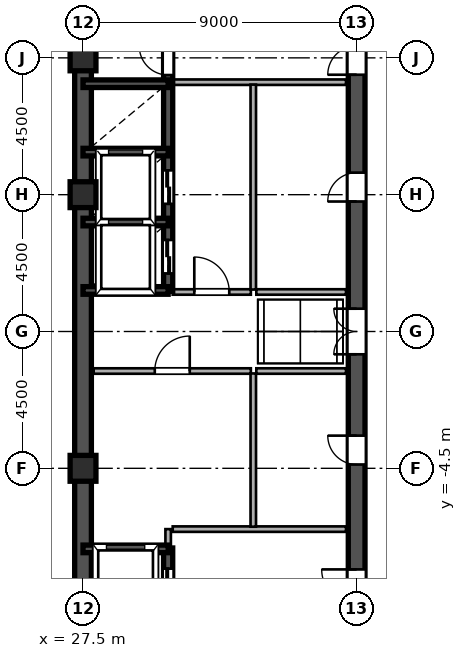
"""IFC4 building model, lengths in metres.
Left out: names, types, materials, properties, quantities, classifications, styles, units other than length and angle.
Written with IfcOpenShell. Run it as: python <this file> out.ifc"""

import sys

from ifc_helpers import new_model, si_unit, direction, frame, frame_2d, origin, origin_2d, place, context, subcontext, project, spatial, rectangle, hollow_rectangle, extrude, source, transform, mapped, element, fill, save


model = new_model("IFC4")
c1 = context("Model", 3, precision=1e-05, world=origin(), true_north=direction((0.0, 1.0)))
c2 = subcontext(c1, "Body", "Model", "MODEL_VIEW")
j1 = project(units=[si_unit("LENGTHUNIT", "METRE"), si_unit("PLANEANGLEUNIT", "RADIAN")], contexts=[c1])
p1 = place(None, origin())
s1 = spatial("IfcSite", under=j1, at=p1, CompositionType="ELEMENT")
p2 = place(p1, origin())
s2 = spatial("IfcBuilding", under=s1, at=p2, CompositionType="ELEMENT")
p3 = place(p2, frame((0.0, 0.0, 174.3)))
s3 = spatial("IfcBuildingStorey", under=s2, at=p3, CompositionType="ELEMENT", Elevation=174.3)
m1 = source(origin(), c2, "Body", "SweptSolid", [
    extrude(hollow_rectangle(XDim=0.85, YDim=0.85, WallThickness=0.036, at=origin_2d()), origin(), (0.0, 0.0, 1.0), 3.6),
])
for number, where, z_axis, x_axis in (
    (1, (27.5, -4.5, 0.0), (0.0, 0.0, 1.0), (1.0, 0.0, 0.0)),
    (2, (27.5, 4.5, 0.0), (0.0, 0.0, 1.0), (1.0, 0.0, 0.0)),
    (3, (27.5, 9.0, 0.0), (0.0, 0.0, 1.0), (1.0, 0.0, 0.0)),
):
    element("IfcColumn", number, at=place(p3, frame(where, z_axis=z_axis, x_axis=x_axis)), inside=s3, PredefinedType="COLUMN", context=c2, shape_type="MappedRepresentation", body=[
        mapped(m1, transform((0.0, 0.0, 0.0), scale=1.0)),
    ])
for number, where, z_axis, x_axis in (
    (4, (27.5, -13.5, 0.0), (0.0, 0.0, 1.0), (0.0, 1.0, 0.0)),
    (5, (27.5, 1.3, 0.0), (0.0, 0.0, 1.0), (0.0, 1.0, 0.0)),
):
    element("IfcWall", number, at=place(p3, frame(where, z_axis=z_axis, x_axis=x_axis)), inside=s3, PredefinedType="SHEAR", context=c2, shape_type="SweptSolid", body=[
        extrude(rectangle(XDim=12.2, YDim=0.55, at=frame_2d((6.1, 0.0))), origin(), (0.0, 0.0, 1.0), 3.38),
    ])
p4 = place(p3, frame((27.5, -1.3, 0.0), z_axis=(0.0, 0.0, 1.0), x_axis=(0.0, 1.0, 0.0)))
e6 = element("IfcWall", 6, at=p4, inside=s3, PredefinedType="SHEAR", context=c2, shape_type="SweptSolid", body=[
    extrude(rectangle(XDim=2.6, YDim=0.55, at=frame_2d((1.3, 0.0))), origin(), (0.0, 0.0, 1.0), 3.38),
])
p5 = place(p3, frame((36.5, -13.65, 0.0), z_axis=(0.0, 0.0, 1.0), x_axis=(0.0, 1.0, 0.0)))
e7 = element("IfcWall", 7, at=p5, inside=s3, PredefinedType="SHEAR", context=c2, shape_type="SweptSolid", body=[
    extrude(rectangle(XDim=7.15, YDim=0.55, at=frame_2d((3.575, 0.0))), origin(), (0.0, 0.0, 1.0), 3.38),
])
p6 = place(p5, frame((4.675, 0.0, 0.0)))
e8 = element("IfcOpeningElement", 8, at=p6, cuts=e7, PredefinedType="OPENING", context=c2, shape_type="SweptSolid", body=[
    extrude(rectangle(XDim=1.15, YDim=2.2, at=frame_2d((0.575, 1.1))), frame((0.0, 0.285, 0.0), z_axis=(0.0, -1.0, 0.0), x_axis=(1.0, 0.0, 0.0)), (0.0, 0.0, 1.0), 0.57),
])
p7 = place(p3, frame((36.5, -1.3, 0.0), z_axis=(0.0, 0.0, 1.0), x_axis=(0.0, 1.0, 0.0)))
e9 = element("IfcWall", 9, at=p7, inside=s3, PredefinedType="SHEAR", context=c2, shape_type="SweptSolid", body=[
    extrude(rectangle(XDim=2.6, YDim=0.55, at=frame_2d((1.3, 0.0))), origin(), (0.0, 0.0, 1.0), 3.38),
])
p8 = place(p7, frame((0.55, 0.0, 0.0)))
e10 = element("IfcOpeningElement", 10, at=p8, cuts=e9, PredefinedType="OPENING", context=c2, shape_type="SweptSolid", body=[
    extrude(rectangle(XDim=1.5, YDim=2.3, at=frame_2d((0.75, 1.15))), frame((0.0, 0.285, 0.0), z_axis=(0.0, -1.0, 0.0), x_axis=(1.0, 0.0, 0.0)), (0.0, 0.0, 1.0), 0.57),
])
p9 = place(p3, frame((36.5, 8.2, 0.0), z_axis=(0.0, 0.0, 1.0), x_axis=(0.0, 1.0, 0.0)))
e11 = element("IfcWall", 11, at=p9, inside=s3, PredefinedType="SHEAR", context=c2, shape_type="SweptSolid", body=[
    extrude(rectangle(XDim=5.45, YDim=0.55, at=frame_2d((2.725, 0.0))), origin(), (0.0, 0.0, 1.0), 3.38),
])
p10 = place(p9, frame((0.245, 0.0, 0.0)))
e12 = element("IfcOpeningElement", 12, at=p10, cuts=e11, PredefinedType="OPENING", context=c2, shape_type="SweptSolid", body=[
    extrude(rectangle(XDim=0.95, YDim=2.15, at=frame_2d((0.475, 1.075))), frame((0.0, 0.285, 0.0), z_axis=(0.0, -1.0, 0.0), x_axis=(1.0, 0.0, 0.0)), (0.0, 0.0, 1.0), 0.57),
])
p11 = place(p3, frame((36.5, -6.5, 0.0), z_axis=(0.0, 0.0, 1.0), x_axis=(0.0, 1.0, 0.0)))
e13 = element("IfcWall", 13, at=p11, inside=s3, PredefinedType="SHEAR", context=c2, shape_type="SweptSolid", body=[
    extrude(rectangle(XDim=5.2, YDim=0.55, at=frame_2d((2.6, 0.0))), origin(), (0.0, 0.0, 1.0), 3.38),
])
p12 = place(p11, frame((2.125, 0.0, 0.0)))
e14 = element("IfcOpeningElement", 14, at=p12, cuts=e13, PredefinedType="OPENING", context=c2, shape_type="SweptSolid", body=[
    extrude(rectangle(XDim=0.95, YDim=2.15, at=frame_2d((0.475, 1.075))), frame((0.0, 0.285, 0.0), z_axis=(0.0, -1.0, 0.0), x_axis=(1.0, 0.0, 0.0)), (0.0, 0.0, 1.0), 0.57),
])
p13 = place(p3, frame((36.5, 1.3, 0.0), z_axis=(0.0, 0.0, 1.0), x_axis=(0.0, 1.0, 0.0)))
e15 = element("IfcWall", 15, at=p13, inside=s3, PredefinedType="SHEAR", context=c2, shape_type="SweptSolid", body=[
    extrude(rectangle(XDim=6.9, YDim=0.55, at=frame_2d((3.45, 0.0))), origin(), (0.0, 0.0, 1.0), 3.38),
])
p14 = place(p13, frame((2.975, 0.0, 0.0)))
e16 = element("IfcOpeningElement", 16, at=p14, cuts=e15, PredefinedType="OPENING", context=c2, shape_type="SweptSolid", body=[
    extrude(rectangle(XDim=0.95, YDim=2.15, at=frame_2d((0.475, 1.075))), frame((0.0, 0.285, 0.0), z_axis=(0.0, -1.0, 0.0), x_axis=(1.0, 0.0, 0.0)), (0.0, 0.0, 1.0), 0.57),
])
for number, where, z_axis, x_axis in (
    (17, (27.5, -7.15, 0.0), (0.0, 0.0, 1.0), (1.0, 0.0, 0.0)),
    (18, (27.5, 1.35, 0.0), (0.0, 0.0, 1.0), (1.0, 0.0, 0.0)),
    (19, (27.5, 3.6, 0.0), (0.0, 0.0, 1.0), (1.0, 0.0, 0.0)),
    (20, (27.5, 5.9, 0.0), (0.0, 0.0, 1.0), (1.0, 0.0, 0.0)),
    (21, (27.5, 8.15, 0.0), (0.0, 0.0, 1.0), (1.0, 0.0, 0.0)),
):
    element("IfcWall", number, at=place(p3, frame(where, z_axis=z_axis, x_axis=x_axis)), inside=s3, PredefinedType="SHEAR", context=c2, shape_type="SweptSolid", body=[
        extrude(rectangle(XDim=2.8, YDim=0.25, at=frame_2d((1.4, 0.0))), origin(), (0.0, 0.0, 1.0), 3.38),
    ])
p15 = place(p3, frame((30.3, -9.68, 0.0), z_axis=(0.0, 0.0, 1.0), x_axis=(0.0, 1.0, 0.0)))
e22 = element("IfcWall", 22, at=p15, inside=s3, PredefinedType="SHEAR", context=c2, shape_type="SweptSolid", body=[
    extrude(rectangle(XDim=2.56, YDim=0.3, at=frame_2d((1.28, 0.0))), origin(), (0.0, 0.0, 1.0), 3.38),
])
p16 = place(p15, frame((0.68, 0.0, 0.0)))
e23 = element("IfcOpeningElement", 23, at=p16, cuts=e22, PredefinedType="OPENING", context=c2, shape_type="SweptSolid", body=[
    extrude(rectangle(XDim=1.2, YDim=2.25, at=frame_2d((0.6, 1.125))), frame((0.0, 0.16, 0.0), z_axis=(0.0, -1.0, 0.0), x_axis=(1.0, 0.0, 0.0)), (0.0, 0.0, 1.0), 0.32),
])
p17 = place(p3, frame((30.3, 1.32, 0.0), z_axis=(0.0, 0.0, 1.0), x_axis=(0.0, 1.0, 0.0)))
e24 = element("IfcWall", 24, at=p17, inside=s3, PredefinedType="SHEAR", context=c2, shape_type="SweptSolid", body=[
    extrude(rectangle(XDim=2.28, YDim=0.3, at=frame_2d((1.14, 0.0))), origin(), (0.0, 0.0, 1.0), 3.38),
])
p18 = place(p17, frame((0.59, 0.0, 0.0)))
e25 = element("IfcOpeningElement", 25, at=p18, cuts=e24, PredefinedType="OPENING", context=c2, shape_type="SweptSolid", body=[
    extrude(rectangle(XDim=1.1, YDim=2.2, at=frame_2d((0.55, 1.1))), frame((0.0, 0.16, 0.0), z_axis=(0.0, -1.0, 0.0), x_axis=(1.0, 0.0, 0.0)), (0.0, 0.0, 1.0), 0.32),
])
p19 = place(p3, frame((30.3, 3.6, 0.0), z_axis=(0.0, 0.0, 1.0), x_axis=(0.0, 1.0, 0.0)))
e26 = element("IfcWall", 26, at=p19, inside=s3, PredefinedType="SHEAR", context=c2, shape_type="SweptSolid", body=[
    extrude(rectangle(XDim=2.3, YDim=0.3, at=frame_2d((1.15, 0.0))), origin(), (0.0, 0.0, 1.0), 3.38),
])
p20 = place(p19, frame((0.6, 0.0, 0.0)))
e27 = element("IfcOpeningElement", 27, at=p20, cuts=e26, PredefinedType="OPENING", context=c2, shape_type="SweptSolid", body=[
    extrude(rectangle(XDim=1.1, YDim=2.2, at=frame_2d((0.55, 1.1))), frame((0.0, 0.16, 0.0), z_axis=(0.0, -1.0, 0.0), x_axis=(1.0, 0.0, 0.0)), (0.0, 0.0, 1.0), 0.32),
])
p21 = place(p3, frame((30.3, 5.9, 0.0), z_axis=(0.0, 0.0, 1.0), x_axis=(0.0, 1.0, 0.0)))
e28 = element("IfcWall", 28, at=p21, inside=s3, PredefinedType="SHEAR", context=c2, shape_type="SweptSolid", body=[
    extrude(rectangle(XDim=2.25, YDim=0.3, at=frame_2d((1.125, 0.0))), origin(), (0.0, 0.0, 1.0), 3.38),
])
p22 = place(p3, frame((30.3, 8.15, 0.0), z_axis=(0.0, 0.0, 1.0), x_axis=(0.0, 1.0, 0.0)))
e29 = element("IfcWall", 29, at=p22, inside=s3, PredefinedType="SHEAR", context=c2, shape_type="SweptSolid", body=[
    extrude(rectangle(XDim=1.53, YDim=0.3, at=frame_2d((0.765, 0.0))), origin(), (0.0, 0.0, 1.0), 3.38),
])
p23 = place(p22, frame((0.285, 0.0, 0.0)))
e30 = element("IfcOpeningElement", 30, at=p23, cuts=e29, PredefinedType="OPENING", context=c2, shape_type="SweptSolid", body=[
    extrude(rectangle(XDim=0.95, YDim=2.15, at=frame_2d((0.475, 1.075))), frame((0.0, 0.16, 0.0), z_axis=(0.0, -1.0, 0.0), x_axis=(1.0, 0.0, 0.0)), (0.0, 0.0, 1.0), 0.32),
])
p24 = place(p3, frame((30.45, -6.5, 0.0), z_axis=(0.0, 0.0, 1.0), x_axis=(1.0, 0.0, 0.0)))
e31 = element("IfcWall", 31, at=p24, inside=s3, PredefinedType="PARTITIONING", context=c2, shape_type="SweptSolid", body=[
    extrude(rectangle(XDim=5.7, YDim=0.18, at=frame_2d((2.85, 0.0))), origin(), (0.0, 0.0, 1.0), 3.38),
])
p25 = place(p3, frame((30.3, -7.12, 0.0), z_axis=(0.0, 0.0, 1.0), x_axis=(0.0, 1.0, 0.0)))
e32 = element("IfcWall", 32, at=p25, inside=s3, PredefinedType="PARTITIONING", context=c2, shape_type="SweptSolid", body=[
    extrude(rectangle(XDim=0.62, YDim=0.18, at=frame_2d((0.31, 0.0))), origin(), (0.0, 0.0, 1.0), 3.38),
])
p26 = place(p3, frame((30.45, 8.2, 0.0), z_axis=(0.0, 0.0, 1.0), x_axis=(1.0, 0.0, 0.0)))
e33 = element("IfcWall", 33, at=p26, inside=s3, PredefinedType="PARTITIONING", context=c2, shape_type="SweptSolid", body=[
    extrude(rectangle(XDim=5.7, YDim=0.18, at=frame_2d((2.85, 0.0))), origin(), (0.0, 0.0, 1.0), 3.38),
])
p27 = place(p3, frame((33.1, -6.42, 0.0), z_axis=(0.0, 0.0, 1.0), x_axis=(0.0, 1.0, 0.0)))
e34 = element("IfcWall", 34, at=p27, inside=s3, PredefinedType="PARTITIONING", context=c2, shape_type="SweptSolid", body=[
    extrude(rectangle(XDim=5.04, YDim=0.18, at=frame_2d((2.52, 0.0))), origin(), (0.0, 0.0, 1.0), 3.38),
])
p28 = place(p3, frame((33.1, 1.38, 0.0), z_axis=(0.0, 0.0, 1.0), x_axis=(0.0, 1.0, 0.0)))
e35 = element("IfcWall", 35, at=p28, inside=s3, PredefinedType="PARTITIONING", context=c2, shape_type="SweptSolid", body=[
    extrude(rectangle(XDim=6.74, YDim=0.18, at=frame_2d((3.37, 0.0))), origin(), (0.0, 0.0, 1.0), 3.38),
])
p29 = place(p3, frame((27.85, -1.3, 0.0), z_axis=(0.0, 0.0, 1.0), x_axis=(1.0, 0.0, 0.0)))
e36 = element("IfcWall", 36, at=p29, inside=s3, PredefinedType="PARTITIONING", context=c2, shape_type="SweptSolid", body=[
    extrude(rectangle(XDim=5.17, YDim=0.18, at=frame_2d((2.585, 0.0))), origin(), (0.0, 0.0, 1.0), 3.38),
])
p30 = place(p29, frame((2.01, 0.0, 0.0)))
e37 = element("IfcOpeningElement", 37, at=p30, cuts=e36, PredefinedType="OPENING", context=c2, shape_type="SweptSolid", body=[
    extrude(rectangle(XDim=1.15, YDim=2.2, at=frame_2d((0.575, 1.1))), frame((0.0, 0.1, 0.0), z_axis=(0.0, -1.0, 0.0), x_axis=(1.0, 0.0, 0.0)), (0.0, 0.0, 1.0), 0.2),
])
p31 = place(p3, frame((30.45, 1.3, 0.0), z_axis=(0.0, 0.0, 1.0), x_axis=(1.0, 0.0, 0.0)))
e38 = element("IfcWall", 38, at=p31, inside=s3, PredefinedType="PARTITIONING", context=c2, shape_type="SweptSolid", body=[
    extrude(rectangle(XDim=2.57, YDim=0.18, at=frame_2d((1.285, 0.0))), origin(), (0.0, 0.0, 1.0), 3.38),
])
p32 = place(p31, frame((0.71, 0.0, 0.0)))
e39 = element("IfcOpeningElement", 39, at=p32, cuts=e38, PredefinedType="OPENING", context=c2, shape_type="SweptSolid", body=[
    extrude(rectangle(XDim=1.15, YDim=2.2, at=frame_2d((0.575, 1.1))), frame((0.0, 0.1, 0.0), z_axis=(0.0, -1.0, 0.0), x_axis=(1.0, 0.0, 0.0)), (0.0, 0.0, 1.0), 0.2),
])
for number, where, z_axis, x_axis in (
    (40, (33.2, -1.3, 0.0), (0.0, 0.0, 1.0), (1.0, 0.0, 0.0)),
    (41, (33.2, 1.3, 0.0), (0.0, 0.0, 1.0), (1.0, 0.0, 0.0)),
):
    element("IfcWall", number, at=place(p3, frame(where, z_axis=z_axis, x_axis=x_axis)), inside=s3, PredefinedType="PARTITIONING", context=c2, shape_type="SweptSolid", body=[
        extrude(rectangle(XDim=2.95, YDim=0.18, at=frame_2d((1.475, 0.0))), origin(), (0.0, 0.0, 1.0), 3.38),
    ])
m2 = source(origin(), c2, "Body", "SweptSolid", [
    extrude(rectangle(XDim=1.15, YDim=2.2, at=frame_2d((0.575, 1.1))), frame((0.0, 0.025, 0.0), z_axis=(0.0, -1.0, 0.0), x_axis=(1.0, 0.0, 0.0)), (0.0, 0.0, 1.0), 0.05),
])
p33 = place(p6, origin())
e42 = element("IfcDoor", 42, at=p33, inside=s3, OperationType="SINGLE_SWING_RIGHT", PredefinedType="DOOR", context=c2, shape_type="MappedRepresentation", body=[
    mapped(m2, transform((0.0, 0.0, 0.0), scale=1.0)),
])
fill(e8, e42)
m3 = source(origin(), c2, "Body", "SweptSolid", [
    extrude(rectangle(XDim=1.5, YDim=2.3, at=frame_2d((0.75, 1.15))), frame((0.0, 0.025, 0.0), z_axis=(0.0, -1.0, 0.0), x_axis=(1.0, 0.0, 0.0)), (0.0, 0.0, 1.0), 0.05),
])
p34 = place(p8, origin())
e43 = element("IfcDoor", 43, at=p34, inside=s3, OperationType="DOUBLE_SWING_LEFT", PredefinedType="DOOR", context=c2, shape_type="MappedRepresentation", body=[
    mapped(m3, transform((0.0, 0.0, 0.0), scale=1.0)),
])
fill(e10, e43)
m4 = source(origin(), c2, "Body", "SweptSolid", [
    extrude(rectangle(XDim=0.95, YDim=2.15, at=frame_2d((0.475, 1.075))), frame((0.0, 0.025, 0.0), z_axis=(0.0, -1.0, 0.0), x_axis=(1.0, 0.0, 0.0)), (0.0, 0.0, 1.0), 0.05),
])
p35 = place(p10, origin())
e44 = element("IfcDoor", 44, at=p35, inside=s3, OperationType="SINGLE_SWING_LEFT", PredefinedType="DOOR", context=c2, shape_type="MappedRepresentation", body=[
    mapped(m4, transform((0.0, 0.0, 0.0), scale=1.0)),
])
fill(e12, e44)
p36 = place(p12, origin())
e45 = element("IfcDoor", 45, at=p36, inside=s3, OperationType="SINGLE_SWING_RIGHT", PredefinedType="DOOR", context=c2, shape_type="MappedRepresentation", body=[
    mapped(m4, transform((0.0, 0.0, 0.0), scale=1.0)),
])
fill(e14, e45)
p37 = place(p14, origin())
e46 = element("IfcDoor", 46, at=p37, inside=s3, OperationType="SINGLE_SWING_LEFT", PredefinedType="DOOR", context=c2, shape_type="MappedRepresentation", body=[
    mapped(m4, transform((0.0, 0.0, 0.0), scale=1.0)),
])
fill(e16, e46)
m5 = source(origin(), c2, "Body", "SweptSolid", [
    extrude(rectangle(XDim=1.2, YDim=2.25, at=frame_2d((0.6, 1.125))), frame((0.0, 0.025, 0.0), z_axis=(0.0, -1.0, 0.0), x_axis=(1.0, 0.0, 0.0)), (0.0, 0.0, 1.0), 0.05),
])
p38 = place(p16, origin())
e47 = element("IfcDoor", 47, at=p38, inside=s3, OperationType="DOUBLE_DOOR_SLIDING", PredefinedType="DOOR", context=c2, shape_type="MappedRepresentation", body=[
    mapped(m5, transform((0.0, 0.0, 0.0), scale=1.0)),
])
fill(e23, e47)
m6 = source(origin(), c2, "Body", "SweptSolid", [
    extrude(rectangle(XDim=1.1, YDim=2.2, at=frame_2d((0.55, 1.1))), frame((0.0, 0.025, 0.0), z_axis=(0.0, -1.0, 0.0), x_axis=(1.0, 0.0, 0.0)), (0.0, 0.0, 1.0), 0.05),
])
p39 = place(p18, origin())
e48 = element("IfcDoor", 48, at=p39, inside=s3, OperationType="DOUBLE_DOOR_SLIDING", PredefinedType="DOOR", context=c2, shape_type="MappedRepresentation", body=[
    mapped(m6, transform((0.0, 0.0, 0.0), scale=1.0)),
])
fill(e25, e48)
p40 = place(p20, origin())
e49 = element("IfcDoor", 49, at=p40, inside=s3, OperationType="DOUBLE_DOOR_SLIDING", PredefinedType="DOOR", context=c2, shape_type="MappedRepresentation", body=[
    mapped(m6, transform((0.0, 0.0, 0.0), scale=1.0)),
])
fill(e27, e49)
p41 = place(p23, origin())
e50 = element("IfcDoor", 50, at=p41, inside=s3, OperationType="SINGLE_SWING_RIGHT", PredefinedType="DOOR", context=c2, shape_type="MappedRepresentation", body=[
    mapped(m4, transform((0.0, 0.0, 0.0), scale=1.0)),
])
fill(e30, e50)
p42 = place(p30, origin())
e51 = element("IfcDoor", 51, at=p42, inside=s3, OperationType="SINGLE_SWING_RIGHT", PredefinedType="DOOR", context=c2, shape_type="MappedRepresentation", body=[
    mapped(m2, transform((0.0, 0.0, 0.0), scale=1.0)),
])
fill(e37, e51)
p43 = place(p32, origin())
e52 = element("IfcDoor", 52, at=p43, inside=s3, OperationType="SINGLE_SWING_LEFT", PredefinedType="DOOR", context=c2, shape_type="MappedRepresentation", body=[
    mapped(m2, transform((0.0, 0.0, 0.0), scale=1.0)),
])
fill(e39, e52)
save(model, sys.argv[1])
